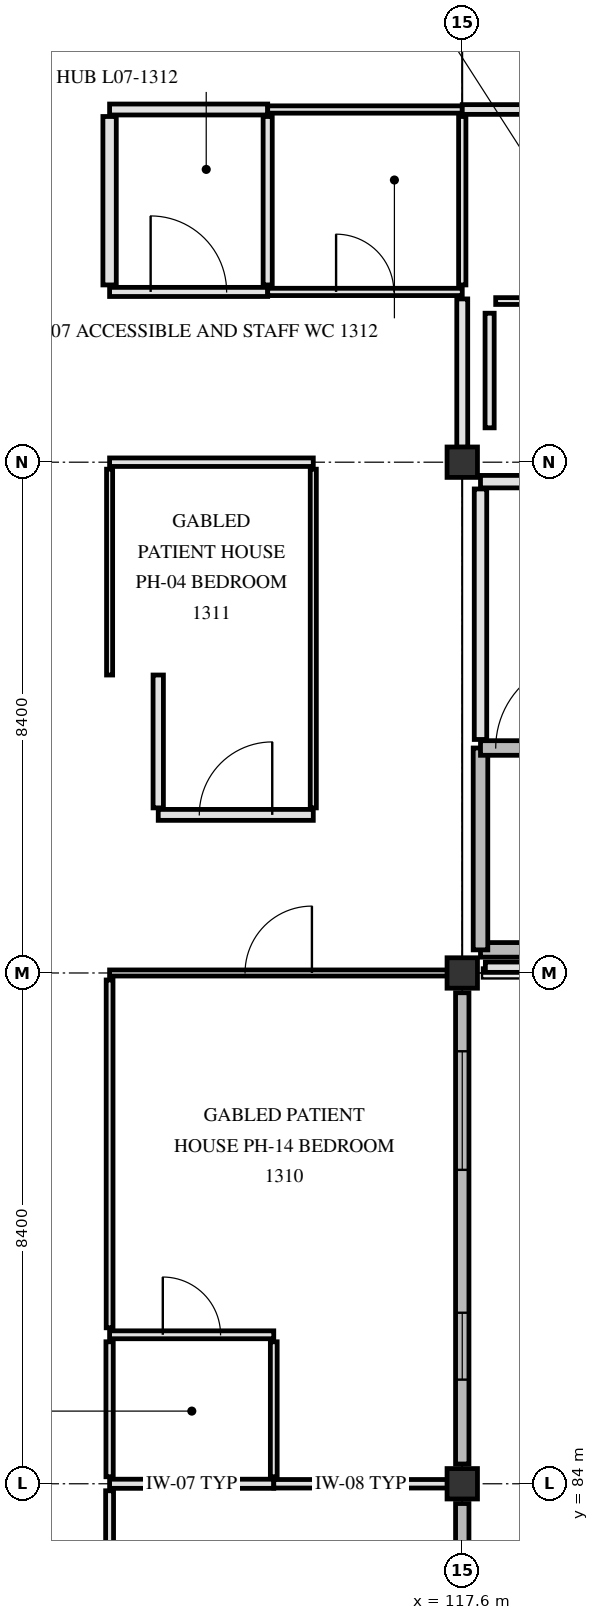
"""IFC4 building model, lengths in metres.
Left out: names, types, materials, properties, quantities, classifications, styles, units other than length and angle.
Written with IfcOpenShell. Run it as: python <this file> out.ifc"""

import sys

from ifc_helpers import new_model, si_unit, direction, frame, frame_2d, origin, origin_2d, place, context, subcontext, project, spatial, polyline, rectangle, outline, extrude, element, fill, save


model = new_model("IFC4")
c1 = context("Model", 3, precision=1e-05, world=origin(), true_north=direction((0.0, 1.0)))
c2 = subcontext(c1, "Body", "Model", "MODEL_VIEW")
j1 = project(units=[si_unit("LENGTHUNIT", "METRE"), si_unit("PLANEANGLEUNIT", "RADIAN")], contexts=[c1])
p1 = place(None, origin())
s1 = spatial("IfcSite", under=j1, at=p1, CompositionType="ELEMENT")
p2 = place(p1, origin())
s2 = spatial("IfcBuilding", under=s1, at=p2, CompositionType="ELEMENT")
p3 = place(p2, frame((0.0, 0.0, 30.3)))
s3 = spatial("IfcBuildingStorey", under=s2, at=p3, CompositionType="ELEMENT", Elevation=30.3)
for number, where, z_axis, x_axis in (
    (1, (117.6, 84.0, 0.0), (0.0, 0.0, 1.0), (1.0, 0.0, 0.0)),
    (2, (117.6, 92.4, 0.0), (0.0, 0.0, 1.0), (1.0, 0.0, 0.0)),
    (3, (117.6, 100.8, 0.0), (0.0, 0.0, 1.0), (1.0, 0.0, 0.0)),
):
    element("IfcColumn", number, at=place(p3, frame(where, z_axis=z_axis, x_axis=x_axis)), inside=s3, PredefinedType="COLUMN", context=c2, shape_type="SweptSolid", body=[
        extrude(rectangle(XDim=0.5, YDim=0.5, at=origin_2d()), origin(), (0.0, 0.0, 1.0), 3.9),
    ])
p4 = place(p3, frame((117.6, 92.075, 0.0), z_axis=(0.0, 0.0, 1.0), x_axis=(0.0, -1.0, 0.0)))
e4 = element("IfcWall", 4, at=p4, inside=s3, PredefinedType="SOLIDWALL", context=c2, shape_type="SweptSolid", body=[
    extrude(outline(polyline([(0.0, 0.0), (7.75, 0.0), (7.75, 3.42), (3.875, 5.76), (0.0, 3.42), (0.0, 0.0)])), frame((0.0, 0.11, 0.0), z_axis=(0.0, -1.0, 0.0), x_axis=(1.0, 0.0, 0.0)), (0.0, 0.0, 1.0), 0.22),
])
p5 = place(p4, frame((0.962, 0.0, 0.85)))
e5 = element("IfcOpeningElement", 5, at=p5, cuts=e4, PredefinedType="OPENING", context=c2, shape_type="SweptSolid", body=[
    extrude(rectangle(XDim=1.95, YDim=1.54, at=frame_2d((0.975, 0.77))), frame((0.0, 0.12, 0.0), z_axis=(0.0, -1.0, 0.0), x_axis=(1.0, 0.0, 0.0)), (0.0, 0.0, 1.0), 0.24),
])
p6 = place(p4, frame((5.262, 0.0, 0.85)))
e6 = element("IfcOpeningElement", 6, at=p6, cuts=e4, PredefinedType="OPENING", context=c2, shape_type="SweptSolid", body=[
    extrude(rectangle(XDim=1.1, YDim=1.66, at=frame_2d((0.55, 0.83))), frame((0.0, 0.12, 0.0), z_axis=(0.0, -1.0, 0.0), x_axis=(1.0, 0.0, 0.0)), (0.0, 0.0, 1.0), 0.24),
])
p7 = place(p3, frame((117.6, 83.675, 0.0), z_axis=(0.0, 0.0, 1.0), x_axis=(0.0, -1.0, 0.0)))
e7 = element("IfcWall", 7, at=p7, inside=s3, PredefinedType="SOLIDWALL", context=c2, shape_type="SweptSolid", body=[
    extrude(outline(polyline([(0.0, 0.0), (7.75, 0.0), (7.75, 3.42), (3.875, 5.76), (0.0, 3.42), (0.0, 0.0)])), frame((0.0, 0.11, 0.0), z_axis=(0.0, -1.0, 0.0), x_axis=(1.0, 0.0, 0.0)), (0.0, 0.0, 1.0), 0.22),
])
p8 = place(p7, frame((1.337, 0.0, 0.85)))
e8 = element("IfcOpeningElement", 8, at=p8, cuts=e7, PredefinedType="OPENING", context=c2, shape_type="SweptSolid", body=[
    extrude(rectangle(XDim=1.2, YDim=1.66, at=frame_2d((0.6, 0.83))), frame((0.0, 0.12, 0.0), z_axis=(0.0, -1.0, 0.0), x_axis=(1.0, 0.0, 0.0)), (0.0, 0.0, 1.0), 0.24),
])
p9 = place(p7, frame((5.163, 0.0, 0.85)))
e9 = element("IfcOpeningElement", 9, at=p9, cuts=e7, PredefinedType="OPENING", context=c2, shape_type="SweptSolid", body=[
    extrude(rectangle(XDim=1.3, YDim=1.66, at=frame_2d((0.65, 0.83))), frame((0.0, 0.12, 0.0), z_axis=(0.0, -1.0, 0.0), x_axis=(1.0, 0.0, 0.0)), (0.0, 0.0, 1.0), 0.24),
])
p10 = place(p3, frame((126.0, 92.495, 3.88), z_axis=(0.0, 0.0, 1.0), x_axis=(-1.0, 0.0, 0.0)))
e10 = element("IfcWall", 10, at=p10, inside=s3, PredefinedType="PARAPET", context=c2, shape_type="SweptSolid", body=[
    extrude(rectangle(XDim=8.02, YDim=0.17, at=frame_2d((4.01, 0.0))), origin(), (0.0, 0.0, 1.0), 0.47),
])
p11 = place(p3, frame((117.9, 92.78, 0.0), z_axis=(0.0, 0.0, 1.0), x_axis=(1.0, 0.0, 0.0)))
e11 = element("IfcWall", 11, at=p11, inside=s3, PredefinedType="SHEAR", context=c2, shape_type="SweptSolid", body=[
    extrude(rectangle(XDim=7.82, YDim=0.24, at=frame_2d((3.91, 0.0))), origin(), (0.0, 0.0, 1.0), 3.66),
])
p12 = place(p3, frame((117.9, 92.78, 0.0), z_axis=(0.0, 0.0, 1.0), x_axis=(0.0, 1.0, 0.0)))
e12 = element("IfcWall", 12, at=p12, inside=s3, PredefinedType="SHEAR", context=c2, shape_type="SweptSolid", body=[
    extrude(rectangle(XDim=3.32, YDim=0.24, at=frame_2d((1.66, 0.0))), origin(), (0.0, 0.0, 1.0), 3.66),
])
p13 = place(p3, frame((117.9, 96.1, 0.0), z_axis=(0.0, 0.0, 1.0), x_axis=(1.0, 0.0, 0.0)))
e13 = element("IfcWall", 13, at=p13, inside=s3, PredefinedType="SHEAR", context=c2, shape_type="SweptSolid", body=[
    extrude(rectangle(XDim=7.82, YDim=0.24, at=frame_2d((3.91, 0.0))), origin(), (0.0, 0.0, 1.0), 3.66),
])
p14 = place(p13, frame((0.25, 0.0, 0.0)))
e14 = element("IfcOpeningElement", 14, at=p14, cuts=e13, PredefinedType="OPENING", context=c2, shape_type="SweptSolid", body=[
    extrude(rectangle(XDim=1.45, YDim=2.2, at=frame_2d((0.725, 1.1))), frame((0.0, 0.13, 0.0), z_axis=(0.0, -1.0, 0.0), x_axis=(1.0, 0.0, 0.0)), (0.0, 0.0, 1.0), 0.26),
])
p15 = place(p3, frame((117.9, 96.24, 0.0), z_axis=(0.0, 0.0, 1.0), x_axis=(0.0, 1.0, 0.0)))
e15 = element("IfcWall", 15, at=p15, inside=s3, PredefinedType="PARTITIONING", context=c2, shape_type="SweptSolid", body=[
    extrude(rectangle(XDim=4.12, YDim=0.205, at=frame_2d((2.06, 0.0))), origin(), (0.0, 0.0, 1.0), 3.65),
])
p16 = place(p3, frame((117.9, 100.48, 0.0), z_axis=(0.0, 0.0, 1.0), x_axis=(1.0, 0.0, 0.0)))
e16 = element("IfcWall", 16, at=p16, inside=s3, PredefinedType="PARTITIONING", context=c2, shape_type="SweptSolid", body=[
    extrude(rectangle(XDim=4.18, YDim=0.205, at=frame_2d((2.09, 0.0))), origin(), (0.0, 0.0, 1.0), 3.65),
])
p17 = place(p16, frame((1.29, 0.0, 0.0)))
e17 = element("IfcOpeningElement", 17, at=p17, cuts=e16, PredefinedType="OPENING", context=c2, shape_type="SweptSolid", body=[
    extrude(rectangle(XDim=1.6, YDim=2.25, at=frame_2d((0.8, 1.125))), frame((0.0, 0.113, 0.0), z_axis=(0.0, -1.0, 0.0), x_axis=(1.0, 0.0, 0.0)), (0.0, 0.0, 1.0), 0.225),
])
p18 = place(p3, frame((111.8, 84.0, 0.0), z_axis=(0.0, 0.0, 1.0), x_axis=(1.0, 0.0, 0.0)))
e18 = element("IfcWall", 18, at=p18, inside=s3, PredefinedType="PARTITIONING", context=c2, shape_type="SweptSolid", body=[
    extrude(rectangle(XDim=2.7, YDim=0.15, at=frame_2d((1.35, 0.0))), origin(), (0.0, 0.0, 1.0), 3.25),
])
p19 = place(p3, frame((114.5, 84.0, 0.0), z_axis=(0.0, 0.0, 1.0), x_axis=(1.0, 0.0, 0.0)))
e19 = element("IfcWall", 19, at=p19, inside=s3, PredefinedType="PARTITIONING", context=c2, shape_type="SweptSolid", body=[
    extrude(rectangle(XDim=2.855, YDim=0.14, at=frame_2d((1.427, 0.0))), origin(), (0.0, 0.0, 1.0), 3.25),
])
p20 = place(p3, frame((111.8, 86.45, 0.0), z_axis=(0.0, 0.0, 1.0), x_axis=(1.0, 0.0, 0.0)))
e20 = element("IfcWall", 20, at=p20, inside=s3, PredefinedType="PARTITIONING", context=c2, shape_type="SweptSolid", body=[
    extrude(rectangle(XDim=2.7, YDim=0.13, at=frame_2d((1.35, 0.0))), origin(), (0.0, 0.0, 1.0), 3.65),
])
p21 = place(p20, frame((0.875, 0.0, 0.0)))
e21 = element("IfcOpeningElement", 21, at=p21, cuts=e20, PredefinedType="OPENING", context=c2, shape_type="SweptSolid", body=[
    extrude(rectangle(XDim=0.95, YDim=2.1, at=frame_2d((0.475, 1.05))), frame((0.0, 0.075, 0.0), z_axis=(0.0, -1.0, 0.0), x_axis=(1.0, 0.0, 0.0)), (0.0, 0.0, 1.0), 0.15),
])
p22 = place(p3, frame((111.8, 92.4, 0.0), z_axis=(0.0, 0.0, 1.0), x_axis=(1.0, 0.0, 0.0)))
e22 = element("IfcWall", 22, at=p22, inside=s3, PredefinedType="PARTITIONING", context=c2, shape_type="SweptSolid", body=[
    extrude(rectangle(XDim=5.555, YDim=0.1, at=frame_2d((2.777, 0.0))), origin(), (0.0, 0.0, 1.0), 3.25),
])
p23 = place(p22, frame((2.228, 0.0, 0.0)))
e23 = element("IfcOpeningElement", 23, at=p23, cuts=e22, PredefinedType="OPENING", context=c2, shape_type="SweptSolid", body=[
    extrude(rectangle(XDim=1.1, YDim=2.15, at=frame_2d((0.55, 1.075))), frame((0.0, 0.06, 0.0), z_axis=(0.0, -1.0, 0.0), x_axis=(1.0, 0.0, 0.0)), (0.0, 0.0, 1.0), 0.12),
])
p24 = place(p3, frame((112.6, 95.0, 0.0), z_axis=(0.0, 0.0, 1.0), x_axis=(1.0, 0.0, 0.0)))
e24 = element("IfcWall", 24, at=p24, inside=s3, PredefinedType="PARTITIONING", context=c2, shape_type="SweptSolid", body=[
    extrude(rectangle(XDim=2.55, YDim=0.18, at=frame_2d((1.275, 0.0))), origin(), (0.0, 0.0, 1.0), 3.65),
])
p25 = place(p24, frame((0.675, 0.0, 0.0)))
e25 = element("IfcOpeningElement", 25, at=p25, cuts=e24, PredefinedType="OPENING", context=c2, shape_type="SweptSolid", body=[
    extrude(rectangle(XDim=1.2, YDim=2.15, at=frame_2d((0.6, 1.075))), frame((0.0, 0.1, 0.0), z_axis=(0.0, -1.0, 0.0), x_axis=(1.0, 0.0, 0.0)), (0.0, 0.0, 1.0), 0.2),
])
p26 = place(p3, frame((111.8, 100.8, 0.0), z_axis=(0.0, 0.0, 1.0), x_axis=(1.0, 0.0, 0.0)))
e26 = element("IfcWall", 26, at=p26, inside=s3, PredefinedType="PARTITIONING", context=c2, shape_type="SweptSolid", body=[
    extrude(rectangle(XDim=3.35, YDim=0.14, at=frame_2d((1.675, 0.0))), origin(), (0.0, 0.0, 1.0), 3.25),
])
p27 = place(p3, frame((118.15, 103.45, 0.0), z_axis=(0.0, 0.0, 1.0), x_axis=(1.0, 0.0, 0.0)))
e27 = element("IfcWall", 27, at=p27, inside=s3, PredefinedType="PARTITIONING", context=c2, shape_type="SweptSolid", body=[
    extrude(rectangle(XDim=7.46, YDim=0.112, at=frame_2d((3.73, 0.0))), origin(), (0.0, 0.0, 1.0), 3.65),
])
p28 = place(p27, frame((3.12, 0.0, 0.0)))
e28 = element("IfcOpeningElement", 28, at=p28, cuts=e27, PredefinedType="OPENING", context=c2, shape_type="SweptSolid", body=[
    extrude(rectangle(XDim=1.22, YDim=2.18, at=frame_2d((0.61, 1.09))), frame((0.0, 0.066, 0.0), z_axis=(0.0, -1.0, 0.0), x_axis=(1.0, 0.0, 0.0)), (0.0, 0.0, 1.0), 0.132),
])
p29 = place(p3, frame((111.8, 103.6, 0.0), z_axis=(0.0, 0.0, 1.0), x_axis=(1.0, 0.0, 0.0)))
e29 = element("IfcWall", 29, at=p29, inside=s3, PredefinedType="PARTITIONING", context=c2, shape_type="SweptSolid", body=[
    extrude(rectangle(XDim=2.6, YDim=0.15, at=frame_2d((1.3, 0.0))), origin(), (0.0, 0.0, 1.0), 3.41),
])
p30 = place(p29, frame((0.675, 0.0, 0.0)))
e30 = element("IfcOpeningElement", 30, at=p30, cuts=e29, PredefinedType="OPENING", context=c2, shape_type="SweptSolid", body=[
    extrude(rectangle(XDim=1.25, YDim=2.2, at=frame_2d((0.625, 1.1))), frame((0.0, 0.085, 0.0), z_axis=(0.0, -1.0, 0.0), x_axis=(1.0, 0.0, 0.0)), (0.0, 0.0, 1.0), 0.17),
])
p31 = place(p3, frame((114.4, 103.6, 0.0), z_axis=(0.0, 0.0, 1.0), x_axis=(1.0, 0.0, 0.0)))
e31 = element("IfcWall", 31, at=p31, inside=s3, PredefinedType="PARTITIONING", context=c2, shape_type="SweptSolid", body=[
    extrude(rectangle(XDim=3.2, YDim=0.12, at=frame_2d((1.6, 0.0))), origin(), (0.0, 0.0, 1.0), 3.25),
])
p32 = place(p31, frame((1.125, 0.0, 0.0)))
e32 = element("IfcOpeningElement", 32, at=p32, cuts=e31, PredefinedType="OPENING", context=c2, shape_type="SweptSolid", body=[
    extrude(rectangle(XDim=0.95, YDim=2.1, at=frame_2d((0.475, 1.05))), frame((0.0, 0.07, 0.0), z_axis=(0.0, -1.0, 0.0), x_axis=(1.0, 0.0, 0.0)), (0.0, 0.0, 1.0), 0.14),
])
p33 = place(p3, frame((111.8, 106.6, 0.0), z_axis=(0.0, 0.0, 1.0), x_axis=(1.0, 0.0, 0.0)))
e33 = element("IfcWall", 33, at=p33, inside=s3, PredefinedType="PARTITIONING", context=c2, shape_type="SweptSolid", body=[
    extrude(rectangle(XDim=2.6, YDim=0.18, at=frame_2d((1.3, 0.0))), origin(), (0.0, 0.0, 1.0), 3.65),
])
p34 = place(p3, frame((114.4, 106.6, 0.0), z_axis=(0.0, 0.0, 1.0), x_axis=(1.0, 0.0, 0.0)))
e34 = element("IfcWall", 34, at=p34, inside=s3, PredefinedType="PARTITIONING", context=c2, shape_type="SweptSolid", body=[
    extrude(rectangle(XDim=3.2, YDim=0.12, at=frame_2d((1.6, 0.0))), origin(), (0.0, 0.0, 1.0), 3.25),
])
p35 = place(p3, frame((117.6, 106.6, 0.0), z_axis=(0.0, 0.0, 1.0), x_axis=(1.0, 0.0, 0.0)))
e35 = element("IfcWall", 35, at=p35, inside=s3, PredefinedType="PARTITIONING", context=c2, shape_type="SweptSolid", body=[
    extrude(rectangle(XDim=8.01, YDim=0.16, at=frame_2d((4.005, 0.0))), origin(), (0.0, 0.0, 1.0), 3.25),
])
p36 = place(p3, frame((111.8, 78.315, 0.0), z_axis=(0.0, 0.0, 1.0), x_axis=(0.0, 1.0, 0.0)))
e36 = element("IfcWall", 36, at=p36, inside=s3, PredefinedType="PARTITIONING", context=c2, shape_type="SweptSolid", body=[
    extrude(rectangle(XDim=5.57, YDim=0.13, at=frame_2d((2.785, 0.0))), origin(), (0.0, 0.0, 1.0), 3.41),
])
p37 = place(p3, frame((111.8, 84.115, 0.0), z_axis=(0.0, 0.0, 1.0), x_axis=(0.0, 1.0, 0.0)))
e37 = element("IfcWall", 37, at=p37, inside=s3, PredefinedType="PARTITIONING", context=c2, shape_type="SweptSolid", body=[
    extrude(rectangle(XDim=2.22, YDim=0.12, at=frame_2d((1.11, 0.0))), origin(), (0.0, 0.0, 1.0), 3.65),
])
p38 = place(p3, frame((111.8, 86.565, 0.0), z_axis=(0.0, 0.0, 1.0), x_axis=(0.0, 1.0, 0.0)))
e38 = element("IfcWall", 38, at=p38, inside=s3, PredefinedType="PARTITIONING", context=c2, shape_type="SweptSolid", body=[
    extrude(rectangle(XDim=5.72, YDim=0.112, at=frame_2d((2.86, 0.0))), origin(), (0.0, 0.0, 1.0), 3.41),
])
p39 = place(p3, frame((111.8, 97.3, 0.0), z_axis=(0.0, 0.0, 1.0), x_axis=(0.0, 1.0, 0.0)))
e39 = element("IfcWall", 39, at=p39, inside=s3, PredefinedType="PARTITIONING", context=c2, shape_type="SweptSolid", body=[
    extrude(rectangle(XDim=3.385, YDim=0.1, at=frame_2d((1.692, 0.0))), origin(), (0.0, 0.0, 1.0), 3.41),
])
p40 = place(p3, frame((111.8, 103.715, 0.0), z_axis=(0.0, 0.0, 1.0), x_axis=(0.0, 1.0, 0.0)))
e40 = element("IfcWall", 40, at=p40, inside=s3, PredefinedType="PARTITIONING", context=c2, shape_type="SweptSolid", body=[
    extrude(rectangle(XDim=2.77, YDim=0.22, at=frame_2d((1.385, 0.0))), origin(), (0.0, 0.0, 1.0), 3.41),
])
p41 = place(p3, frame((112.6, 95.115, 0.0), z_axis=(0.0, 0.0, 1.0), x_axis=(0.0, 1.0, 0.0)))
e41 = element("IfcWall", 41, at=p41, inside=s3, PredefinedType="PARTITIONING", context=c2, shape_type="SweptSolid", body=[
    extrude(rectangle(XDim=2.185, YDim=0.17, at=frame_2d((1.093, 0.0))), origin(), (0.0, 0.0, 1.0), 3.41),
])
p42 = place(p3, frame((114.4, 103.715, 0.0), z_axis=(0.0, 0.0, 1.0), x_axis=(0.0, 1.0, 0.0)))
e42 = element("IfcWall", 42, at=p42, inside=s3, PredefinedType="PARTITIONING", context=c2, shape_type="SweptSolid", body=[
    extrude(rectangle(XDim=2.77, YDim=0.15, at=frame_2d((1.385, 0.0))), origin(), (0.0, 0.0, 1.0), 3.41),
])
p43 = place(p3, frame((114.5, 84.115, 0.0), z_axis=(0.0, 0.0, 1.0), x_axis=(0.0, 1.0, 0.0)))
e43 = element("IfcWall", 43, at=p43, inside=s3, PredefinedType="PARTITIONING", context=c2, shape_type="SweptSolid", body=[
    extrude(rectangle(XDim=2.22, YDim=0.112, at=frame_2d((1.11, 0.0))), origin(), (0.0, 0.0, 1.0), 3.65),
])
p44 = place(p3, frame((115.15, 95.115, 0.0), z_axis=(0.0, 0.0, 1.0), x_axis=(0.0, 1.0, 0.0)))
e44 = element("IfcWall", 44, at=p44, inside=s3, PredefinedType="PARTITIONING", context=c2, shape_type="SweptSolid", body=[
    extrude(rectangle(XDim=5.57, YDim=0.1, at=frame_2d((2.785, 0.0))), origin(), (0.0, 0.0, 1.0), 3.41),
])
p45 = place(p3, frame((117.6, 101.045, 0.0), z_axis=(0.0, 0.0, 1.0), x_axis=(0.0, 1.0, 0.0)))
e45 = element("IfcWall", 45, at=p45, inside=s3, PredefinedType="PARTITIONING", context=c2, shape_type="SweptSolid", body=[
    extrude(rectangle(XDim=2.44, YDim=0.18, at=frame_2d((1.22, 0.0))), origin(), (0.0, 0.0, 1.0), 3.25),
])
p46 = place(p3, frame((117.6, 103.715, 0.0), z_axis=(0.0, 0.0, 1.0), x_axis=(0.0, 1.0, 0.0)))
e46 = element("IfcWall", 46, at=p46, inside=s3, PredefinedType="PARTITIONING", context=c2, shape_type="SweptSolid", body=[
    extrude(rectangle(XDim=2.77, YDim=0.12, at=frame_2d((1.385, 0.0))), origin(), (0.0, 0.0, 1.0), 3.25),
])
p47 = place(p3, frame((118.05, 101.365, 0.0), z_axis=(0.0, 0.0, 1.0), x_axis=(0.0, 1.0, 0.0)))
e47 = element("IfcWall", 47, at=p47, inside=s3, PredefinedType="PARTITIONING", context=c2, shape_type="SweptSolid", body=[
    extrude(rectangle(XDim=1.885, YDim=0.15, at=frame_2d((0.942, 0.0))), origin(), (0.0, 0.0, 1.0), 3.65),
])
p48 = place(p5, origin())
e48 = element("IfcWindow", 48, at=p48, inside=s3, PartitioningType="SINGLE_PANEL", PredefinedType="WINDOW", context=c2, shape_type="SweptSolid", body=[
    extrude(rectangle(XDim=1.95, YDim=1.54, at=frame_2d((0.975, 0.77))), frame((0.0, 0.03, 0.0), z_axis=(0.0, -1.0, 0.0), x_axis=(1.0, 0.0, 0.0)), (0.0, 0.0, 1.0), 0.06),
])
fill(e5, e48)
p49 = place(p6, origin())
e49 = element("IfcWindow", 49, at=p49, inside=s3, PartitioningType="SINGLE_PANEL", PredefinedType="WINDOW", context=c2, shape_type="SweptSolid", body=[
    extrude(rectangle(XDim=1.1, YDim=1.66, at=frame_2d((0.55, 0.83))), frame((0.0, 0.03, 0.0), z_axis=(0.0, -1.0, 0.0), x_axis=(1.0, 0.0, 0.0)), (0.0, 0.0, 1.0), 0.06),
])
fill(e6, e49)
p50 = place(p14, origin())
e50 = element("IfcDoor", 50, at=p50, inside=s3, OperationType="SINGLE_SWING_RIGHT", PredefinedType="DOOR", context=c2, shape_type="SweptSolid", body=[
    extrude(rectangle(XDim=1.45, YDim=2.2, at=frame_2d((0.725, 1.1))), frame((0.0, 0.025, 0.0), z_axis=(0.0, -1.0, 0.0), x_axis=(1.0, 0.0, 0.0)), (0.0, 0.0, 1.0), 0.05),
])
fill(e14, e50)
p51 = place(p23, origin())
e51 = element("IfcDoor", 51, at=p51, inside=s3, OperationType="SINGLE_SWING_RIGHT", PredefinedType="DOOR", context=c2, shape_type="SweptSolid", body=[
    extrude(rectangle(XDim=1.1, YDim=2.15, at=frame_2d((0.55, 1.075))), frame((0.0, 0.025, 0.0), z_axis=(0.0, -1.0, 0.0), x_axis=(1.0, 0.0, 0.0)), (0.0, 0.0, 1.0), 0.05),
])
fill(e23, e51)
p52 = place(p21, origin())
e52 = element("IfcDoor", 52, at=p52, inside=s3, OperationType="SINGLE_SWING_LEFT", PredefinedType="DOOR", context=c2, shape_type="SweptSolid", body=[
    extrude(rectangle(XDim=0.95, YDim=2.1, at=frame_2d((0.475, 1.05))), frame((0.0, 0.025, 0.0), z_axis=(0.0, -1.0, 0.0), x_axis=(1.0, 0.0, 0.0)), (0.0, 0.0, 1.0), 0.05),
])
fill(e21, e52)
p53 = place(p25, origin())
e53 = element("IfcDoor", 53, at=p53, inside=s3, OperationType="SINGLE_SWING_RIGHT", PredefinedType="DOOR", context=c2, shape_type="SweptSolid", body=[
    extrude(rectangle(XDim=1.2, YDim=2.15, at=frame_2d((0.6, 1.075))), frame((0.0, 0.025, 0.0), z_axis=(0.0, -1.0, 0.0), x_axis=(1.0, 0.0, 0.0)), (0.0, 0.0, 1.0), 0.05),
])
fill(e25, e53)
p54 = place(p30, origin())
e54 = element("IfcDoor", 54, at=p54, inside=s3, OperationType="SINGLE_SWING_LEFT", PredefinedType="DOOR", context=c2, shape_type="SweptSolid", body=[
    extrude(rectangle(XDim=1.25, YDim=2.2, at=frame_2d((0.625, 1.1))), frame((0.0, 0.025, 0.0), z_axis=(0.0, -1.0, 0.0), x_axis=(1.0, 0.0, 0.0)), (0.0, 0.0, 1.0), 0.05),
])
fill(e30, e54)
p55 = place(p32, origin())
e55 = element("IfcDoor", 55, at=p55, inside=s3, OperationType="SINGLE_SWING_LEFT", PredefinedType="DOOR", context=c2, shape_type="SweptSolid", body=[
    extrude(rectangle(XDim=0.95, YDim=2.1, at=frame_2d((0.475, 1.05))), frame((0.0, 0.025, 0.0), z_axis=(0.0, -1.0, 0.0), x_axis=(1.0, 0.0, 0.0)), (0.0, 0.0, 1.0), 0.05),
])
fill(e32, e55)
save(model, sys.argv[1])
